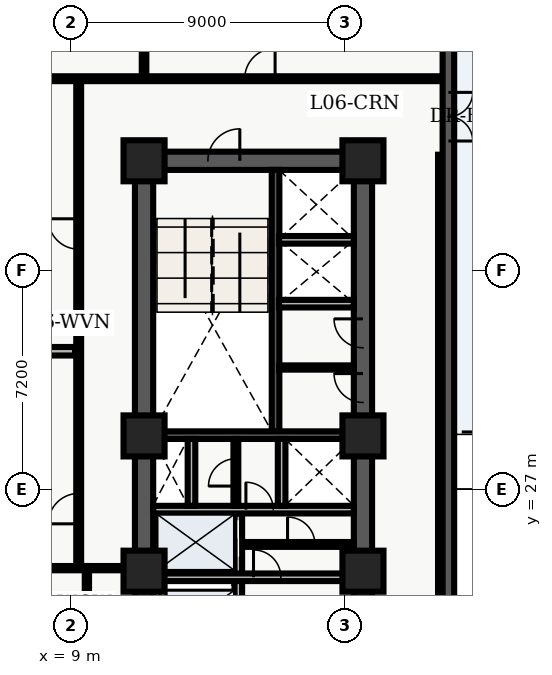
"""IFC4 building model, lengths in metres.
Left out: names, types, materials, properties, quantities, classifications, styles, units other than length and angle.
Written with IfcOpenShell. Run it as: python <this file> out.ifc"""

import sys

from ifc_helpers import new_model, entity, si_unit, converted_unit, direction, frame, origin_with_axes, origin_2d_with_axis, place, context, subcontext, project, spatial, polyline, rectangle, outline, extrude, element, fill, save


model = new_model("IFC4")
c1 = context("Model", 3, precision=1e-05, world=origin_with_axes(), true_north=direction((0.0, 1.0)))
c2 = subcontext(c1, "Body", "Model", "MODEL_VIEW")
j1 = project(units=[si_unit("LENGTHUNIT", "METRE"), converted_unit("PLANEANGLEUNIT", "DEGREE", entity("IfcPlaneAngleMeasure", 0.017), si_unit("PLANEANGLEUNIT", "RADIAN"), dimensions=[0, 0, 0, 0, 0, 0, 0])], contexts=[c1])
p1 = place(None, origin_with_axes())
s1 = spatial("IfcSite", under=j1, at=p1, CompositionType="ELEMENT")
p2 = place(p1, origin_with_axes())
s2 = spatial("IfcBuilding", under=s1, at=p2, CompositionType="ELEMENT")
p3 = place(p2, frame((0.0, 0.0, 28.8), z_axis=(0.0, 0.0, 1.0), x_axis=(1.0, 0.0, 0.0)))
s3 = spatial("IfcBuildingStorey", under=s2, at=p3, CompositionType="ELEMENT", Elevation=28.8)
p4 = place(p3, frame((11.4, 10.8, 0.0), z_axis=(0.0, 0.0, 1.0), x_axis=(0.0, 1.0, 0.0)))
e1 = element("IfcWall", 1, at=p4, inside=s3, PredefinedType="SHEAR", context=c2, shape_type="SweptSolid", body=[
    extrude(outline(polyline([(0.0, -0.3), (27.0, -0.3), (27.0, 0.3), (0.0, 0.3), (0.0, -0.3)])), origin_with_axes(), (0.0, 0.0, 1.0), 3.66),
])
p5 = place(p3, frame((11.4, 37.8, 0.0), z_axis=(0.0, 0.0, 1.0), x_axis=(1.0, 0.0, 0.0)))
e2 = element("IfcWall", 2, at=p5, inside=s3, PredefinedType="SHEAR", context=c2, shape_type="SweptSolid", body=[
    extrude(outline(polyline([(0.0, -0.3), (7.2, -0.3), (7.2, 0.3), (0.0, 0.3), (0.0, -0.3)])), origin_with_axes(), (0.0, 0.0, 1.0), 3.66),
])
p6 = place(p5, frame((2.625, 0.0, 0.0), z_axis=(0.0, 0.0, 1.0), x_axis=(1.0, 0.0, 0.0)))
e3 = element("IfcOpeningElement", 3, at=p6, cuts=e2, PredefinedType="OPENING", context=c2, shape_type="SweptSolid", body=[
    extrude(rectangle(XDim=1.05, YDim=0.62, at=origin_2d_with_axis()), origin_with_axes(), (0.0, 0.0, 1.0), 2.15),
])
p7 = place(p3, frame((18.6, 10.8, 0.0), z_axis=(0.0, 0.0, 1.0), x_axis=(0.0, 1.0, 0.0)))
e4 = element("IfcWall", 4, at=p7, inside=s3, PredefinedType="SHEAR", context=c2, shape_type="SweptSolid", body=[
    extrude(outline(polyline([(0.0, -0.3), (13.5, -0.3), (13.5, 0.3), (0.0, 0.3), (0.0, -0.3)])), origin_with_axes(), (0.0, 0.0, 1.0), 3.66),
])
p8 = place(p7, frame((1.3, 0.0, 0.0), z_axis=(0.0, 0.0, 1.0), x_axis=(1.0, 0.0, 0.0)))
e5 = element("IfcOpeningElement", 5, at=p8, cuts=e4, PredefinedType="OPENING", context=c2, shape_type="SweptSolid", body=[
    extrude(rectangle(XDim=1.1, YDim=0.62, at=origin_2d_with_axis()), origin_with_axes(), (0.0, 0.0, 1.0), 2.15),
])
p9 = place(p7, frame((3.4, 0.0, 0.0), z_axis=(0.0, 0.0, 1.0), x_axis=(1.0, 0.0, 0.0)))
e6 = element("IfcOpeningElement", 6, at=p9, cuts=e4, PredefinedType="OPENING", context=c2, shape_type="SweptSolid", body=[
    extrude(rectangle(XDim=1.1, YDim=0.62, at=origin_2d_with_axis()), origin_with_axes(), (0.0, 0.0, 1.0), 2.15),
])
p10 = place(p7, frame((11.125, 0.0, 0.0), z_axis=(0.0, 0.0, 1.0), x_axis=(1.0, 0.0, 0.0)))
e7 = element("IfcOpeningElement", 7, at=p10, cuts=e4, PredefinedType="OPENING", context=c2, shape_type="SweptSolid", body=[
    extrude(rectangle(XDim=1.05, YDim=0.62, at=origin_2d_with_axis()), origin_with_axes(), (0.0, 0.0, 1.0), 2.15),
])
p11 = place(p3, frame((18.6, 24.3, 0.0), z_axis=(0.0, 0.0, 1.0), x_axis=(0.0, 1.0, 0.0)))
e8 = element("IfcWall", 8, at=p11, inside=s3, PredefinedType="SHEAR", context=c2, shape_type="SweptSolid", body=[
    extrude(outline(polyline([(0.0, -0.3), (13.5, -0.3), (13.5, 0.3), (0.0, 0.3), (0.0, -0.3)])), origin_with_axes(), (0.0, 0.0, 1.0), 3.66),
])
p12 = place(p11, frame((6.025, 0.0, 0.0), z_axis=(0.0, 0.0, 1.0), x_axis=(1.0, 0.0, 0.0)))
e9 = element("IfcOpeningElement", 9, at=p12, cuts=e8, PredefinedType="OPENING", context=c2, shape_type="SweptSolid", body=[
    extrude(rectangle(XDim=0.95, YDim=0.62, at=origin_2d_with_axis()), origin_with_axes(), (0.0, 0.0, 1.0), 2.15),
])
p13 = place(p11, frame((7.825, 0.0, 0.0), z_axis=(0.0, 0.0, 1.0), x_axis=(1.0, 0.0, 0.0)))
e10 = element("IfcOpeningElement", 10, at=p13, cuts=e8, PredefinedType="OPENING", context=c2, shape_type="SweptSolid", body=[
    extrude(rectangle(XDim=0.95, YDim=0.62, at=origin_2d_with_axis()), origin_with_axes(), (0.0, 0.0, 1.0), 2.15),
])
p14 = place(p3, frame((15.725, 28.9, 0.0), z_axis=(0.0, 0.0, 1.0), x_axis=(0.0, 1.0, 0.0)))
e11 = element("IfcWall", 11, at=p14, inside=s3, PredefinedType="SHEAR", context=c2, shape_type="SweptSolid", body=[
    extrude(outline(polyline([(0.0, -0.125), (8.6, -0.125), (8.6, 0.125), (0.0, 0.125), (0.0, -0.125)])), origin_with_axes(), (0.0, 0.0, 1.0), 3.66),
])
p15 = place(p3, frame((11.7, 28.775, 0.0), z_axis=(0.0, 0.0, 1.0), x_axis=(1.0, 0.0, 0.0)))
e12 = element("IfcWall", 12, at=p15, inside=s3, PredefinedType="SHEAR", context=c2, shape_type="SweptSolid", body=[
    extrude(outline(polyline([(0.0, -0.125), (6.6, -0.125), (6.6, 0.125), (0.0, 0.125), (0.0, -0.125)])), origin_with_axes(), (0.0, 0.0, 1.0), 3.66),
])
p16 = place(p3, frame((14.5, 19.95, 0.0), z_axis=(0.0, 0.0, 1.0), x_axis=(0.0, 1.0, 0.0)))
e13 = element("IfcWall", 13, at=p16, inside=s3, PredefinedType="SOLIDWALL", context=c2, shape_type="SweptSolid", body=[
    extrude(outline(polyline([(0.0, -0.125), (6.25, -0.125), (6.25, 0.125), (0.0, 0.125), (0.0, -0.125)])), origin_with_axes(), (0.0, 0.0, 1.0), 2.7),
])
p17 = place(p16, frame((1.025, 0.0, 0.0), z_axis=(0.0, 0.0, 1.0), x_axis=(1.0, 0.0, 0.0)))
e14 = element("IfcOpeningElement", 14, at=p17, cuts=e13, PredefinedType="OPENING", context=c2, shape_type="SweptSolid", body=[
    extrude(rectangle(XDim=1.1, YDim=0.27, at=origin_2d_with_axis()), origin_with_axes(), (0.0, 0.0, 1.0), 2.15),
])
p18 = place(p16, frame((2.975, 0.0, 0.0), z_axis=(0.0, 0.0, 1.0), x_axis=(1.0, 0.0, 0.0)))
e15 = element("IfcOpeningElement", 15, at=p18, cuts=e13, PredefinedType="OPENING", context=c2, shape_type="SweptSolid", body=[
    extrude(rectangle(XDim=1.1, YDim=0.27, at=origin_2d_with_axis()), origin_with_axes(), (0.0, 0.0, 1.0), 2.15),
])
p19 = place(p16, frame((5.425, 0.0, 0.0), z_axis=(0.0, 0.0, 1.0), x_axis=(1.0, 0.0, 0.0)))
e16 = element("IfcOpeningElement", 16, at=p19, cuts=e13, PredefinedType="OPENING", context=c2, shape_type="SweptSolid", body=[
    extrude(rectangle(XDim=1.2, YDim=0.27, at=origin_2d_with_axis()), origin_with_axes(), (0.0, 0.0, 1.0), 2.15),
])
p20 = place(p3, frame((11.7, 24.1, 0.0), z_axis=(0.0, 0.0, 1.0), x_axis=(1.0, 0.0, 0.0)))
e17 = element("IfcWall", 17, at=p20, inside=s3, PredefinedType="SOLIDWALL", context=c2, shape_type="SweptSolid", body=[
    extrude(outline(polyline([(0.0, -0.125), (6.6, -0.125), (6.6, 0.125), (0.0, 0.125), (0.0, -0.125)])), origin_with_axes(), (0.0, 0.0, 1.0), 2.7),
])
p21 = place(p20, frame((3.75, 0.0, 0.0), z_axis=(0.0, 0.0, 1.0), x_axis=(1.0, 0.0, 0.0)))
e18 = element("IfcOpeningElement", 18, at=p21, cuts=e17, PredefinedType="OPENING", context=c2, shape_type="SweptSolid", body=[
    extrude(rectangle(XDim=0.9, YDim=0.27, at=origin_2d_with_axis()), origin_with_axes(), (0.0, 0.0, 1.0), 2.15),
])
p22 = place(p3, frame((11.7, 26.325, 0.0), z_axis=(0.0, 0.0, 1.0), x_axis=(1.0, 0.0, 0.0)))
e19 = element("IfcWall", 19, at=p22, inside=s3, PredefinedType="SOLIDWALL", context=c2, shape_type="SweptSolid", body=[
    extrude(outline(polyline([(0.0, -0.125), (6.6, -0.125), (6.6, 0.125), (0.0, 0.125), (0.0, -0.125)])), origin_with_axes(), (0.0, 0.0, 1.0), 2.7),
])
p23 = place(p22, frame((3.5, 0.0, 0.0), z_axis=(0.0, 0.0, 1.0), x_axis=(1.0, 0.0, 0.0)))
e20 = element("IfcOpeningElement", 20, at=p23, cuts=e19, PredefinedType="OPENING", context=c2, shape_type="SweptSolid", body=[
    extrude(rectangle(XDim=0.9, YDim=0.27, at=origin_2d_with_axis()), origin_with_axes(), (0.0, 0.0, 1.0), 2.15),
])
for number, where, z_axis, x_axis in (
    (21, (12.96, 26.45, 0.0), (0.0, 0.0, 1.0), (0.0, 1.0, 0.0)),
    (22, (15.925, 26.45, 0.0), (0.0, 0.0, 1.0), (0.0, 1.0, 0.0)),
):
    element("IfcWall", number, at=place(p3, frame(where, z_axis=z_axis, x_axis=x_axis)), inside=s3, PredefinedType="SOLIDWALL", context=c2, shape_type="SweptSolid", body=[
        extrude(outline(polyline([(0.0, -0.125), (2.2, -0.125), (2.2, 0.125), (0.0, 0.125), (0.0, -0.125)])), origin_with_axes(), (0.0, 0.0, 1.0), 2.7),
    ])
for number, where, z_axis, x_axis in (
    (23, (11.4, 24.3, 0.0), (0.0, 0.0, 1.0), (1.0, 0.0, 0.0)),
    (24, (11.4, 28.75, 0.0), (0.0, 0.0, 1.0), (1.0, 0.0, 0.0)),
    (25, (11.4, 37.8, 0.0), (0.0, 0.0, 1.0), (1.0, 0.0, 0.0)),
    (26, (18.6, 24.3, 0.0), (0.0, 0.0, 1.0), (1.0, 0.0, 0.0)),
    (27, (18.6, 28.75, 0.0), (0.0, 0.0, 1.0), (1.0, 0.0, 0.0)),
    (28, (18.6, 37.8, 0.0), (0.0, 0.0, 1.0), (1.0, 0.0, 0.0)),
):
    element("IfcColumn", number, at=place(p3, frame(where, z_axis=z_axis, x_axis=x_axis)), inside=s3, PredefinedType="COLUMN", context=c2, shape_type="SweptSolid", body=[
        extrude(rectangle(XDim=1.35, YDim=1.35, at=origin_2d_with_axis()), origin_with_axes(), (0.0, 0.0, 1.0), 3.9),
    ])
p24 = place(p3, frame((14.62, 25.18, 0.0), z_axis=(0.0, 0.0, 1.0), x_axis=(1.0, 0.0, 0.0)))
e29 = element("IfcWall", 29, at=p24, inside=s3, PredefinedType="PARTITIONING", context=c2, shape_type="SweptSolid", body=[
    extrude(outline(polyline([(0.0, -0.08), (3.68, -0.08), (3.68, 0.08), (0.0, 0.08), (0.0, -0.08)])), origin_with_axes(), (0.0, 0.0, 1.0), 2.7),
])
p25 = place(p24, frame((1.95, 0.0, 0.0), z_axis=(0.0, 0.0, 1.0), x_axis=(1.0, 0.0, 0.0)))
e30 = element("IfcOpeningElement", 30, at=p25, cuts=e29, PredefinedType="OPENING", context=c2, shape_type="SweptSolid", body=[
    extrude(rectangle(XDim=0.9, YDim=0.18, at=origin_2d_with_axis()), origin_with_axes(), (0.0, 0.0, 1.0), 2.15),
])
p26 = place(p3, frame((14.42, 26.45, 0.0), z_axis=(0.0, 0.0, 1.0), x_axis=(0.0, 1.0, 0.0)))
e31 = element("IfcWall", 31, at=p26, inside=s3, PredefinedType="PARTITIONING", context=c2, shape_type="SweptSolid", body=[
    extrude(outline(polyline([(0.0, -0.08), (2.2, -0.08), (2.2, 0.08), (0.0, 0.08), (0.0, -0.08)])), origin_with_axes(), (0.0, 0.0, 1.0), 2.7),
])
p27 = place(p26, frame((1.1, 0.0, 0.0), z_axis=(0.0, 0.0, 1.0), x_axis=(1.0, 0.0, 0.0)))
e32 = element("IfcOpeningElement", 32, at=p27, cuts=e31, PredefinedType="OPENING", context=c2, shape_type="SweptSolid", body=[
    extrude(rectangle(XDim=0.9, YDim=0.18, at=origin_2d_with_axis()), origin_with_axes(), (0.0, 0.0, 1.0), 2.15),
])
for number, where, z_axis, x_axis in (
    (33, (15.84, 33.1, 0.0), (0.0, 0.0, 1.0), (1.0, 0.0, 0.0)),
    (34, (15.84, 35.2, 0.0), (0.0, 0.0, 1.0), (1.0, 0.0, 0.0)),
):
    element("IfcWall", number, at=place(p3, frame(where, z_axis=z_axis, x_axis=x_axis)), inside=s3, PredefinedType="SOLIDWALL", context=c2, shape_type="SweptSolid", body=[
        extrude(outline(polyline([(0.0, -0.125), (2.46, -0.125), (2.46, 0.125), (0.0, 0.125), (0.0, -0.125)])), origin_with_axes(), (0.0, 0.0, 1.0), 2.7),
    ])
p28 = place(p3, frame((15.84, 31.0, 0.0), z_axis=(0.0, 0.0, 1.0), x_axis=(1.0, 0.0, 0.0)))
e35 = element("IfcWall", 35, at=p28, inside=s3, PredefinedType="PARTITIONING", context=c2, shape_type="SweptSolid", body=[
    extrude(outline(polyline([(0.0, -0.07), (2.46, -0.07), (2.46, 0.07), (0.0, 0.07), (0.0, -0.07)])), origin_with_axes(), (0.0, 0.0, 1.0), 2.7),
])
p29 = place(p3, frame((9.52, 20.4, 0.0), z_axis=(0.0, 0.0, 1.0), x_axis=(0.0, 1.0, 0.0)))
e36 = element("IfcWall", 36, at=p29, inside=s3, PredefinedType="PARTITIONING", context=c2, shape_type="SweptSolid", body=[
    extrude(outline(polyline([(0.0, -0.07), (4.0, -0.07), (4.0, 0.07), (0.0, 0.07), (0.0, -0.07)])), origin_with_axes(), (0.0, 0.0, 1.0), 2.7),
])
p30 = place(p3, frame((9.52, 24.4, 0.0), z_axis=(0.0, 0.0, 1.0), x_axis=(1.0, 0.0, 0.0)))
e37 = element("IfcWall", 37, at=p30, inside=s3, PredefinedType="PARTITIONING", context=c2, shape_type="SweptSolid", body=[
    extrude(outline(polyline([(0.0, -0.07), (1.58, -0.07), (1.58, 0.07), (0.0, 0.07), (0.0, -0.07)])), origin_with_axes(), (0.0, 0.0, 1.0), 2.7),
])
p31 = place(p3, frame((2.6, 40.5, 0.0), z_axis=(0.0, 0.0, 1.0), x_axis=(1.0, 0.0, 0.0)))
e38 = element("IfcWall", 38, at=p31, inside=s3, PredefinedType="PARTITIONING", context=c2, shape_type="SweptSolid", body=[
    extrude(outline(polyline([(0.0, -0.08), (18.65, -0.08), (18.65, 0.08), (0.0, 0.08), (0.0, -0.08)])), origin_with_axes(), (0.0, 0.0, 1.0), 2.7),
])
p32 = place(p31, frame((4.395, 0.0, 0.0), z_axis=(0.0, 0.0, 1.0), x_axis=(1.0, 0.0, 0.0)))
e39 = element("IfcOpeningElement", 39, at=p32, cuts=e38, PredefinedType="OPENING", context=c2, shape_type="SweptSolid", body=[
    extrude(rectangle(XDim=1.2, YDim=0.18, at=origin_2d_with_axis()), origin_with_axes(), (0.0, 0.0, 1.0), 2.2),
])
p33 = place(p31, frame((12.61, 0.0, 0.0), z_axis=(0.0, 0.0, 1.0), x_axis=(1.0, 0.0, 0.0)))
e40 = element("IfcOpeningElement", 40, at=p33, cuts=e38, PredefinedType="OPENING", context=c2, shape_type="SweptSolid", body=[
    extrude(rectangle(XDim=1.0, YDim=0.18, at=origin_2d_with_axis()), origin_with_axes(), (0.0, 0.0, 1.0), 2.15),
])
p34 = place(p3, frame((21.15, 7.8, 0.0), z_axis=(0.0, 0.0, 1.0), x_axis=(0.0, 1.0, 0.0)))
e41 = element("IfcWall", 41, at=p34, inside=s3, PredefinedType="PARTITIONING", context=c2, shape_type="SweptSolid", body=[
    extrude(outline(polyline([(0.0, -0.08), (30.2, -0.08), (30.2, 0.08), (0.0, 0.08), (0.0, -0.08)])), origin_with_axes(), (0.0, 0.0, 1.0), 2.7),
])
p35 = place(p34, frame((5.775, 0.0, 0.0), z_axis=(0.0, 0.0, 1.0), x_axis=(1.0, 0.0, 0.0)))
e42 = element("IfcOpeningElement", 42, at=p35, cuts=e41, PredefinedType="OPENING", context=c2, shape_type="SweptSolid", body=[
    extrude(rectangle(XDim=1.05, YDim=0.18, at=origin_2d_with_axis()), origin_with_axes(), (0.0, 0.0, 1.0), 2.15),
])
p36 = place(p3, frame((9.25, 24.4, 0.0), z_axis=(0.0, 0.0, 1.0), x_axis=(0.0, 1.0, 0.0)))
e43 = element("IfcWall", 43, at=p36, inside=s3, PredefinedType="PARTITIONING", context=c2, shape_type="SweptSolid", body=[
    extrude(outline(polyline([(0.0, -0.08), (16.1, -0.08), (16.1, 0.08), (0.0, 0.08), (0.0, -0.08)])), origin_with_axes(), (0.0, 0.0, 1.0), 2.7),
])
p37 = place(p36, frame((1.958, 0.0, 0.0), z_axis=(0.0, 0.0, 1.0), x_axis=(1.0, 0.0, 0.0)))
e44 = element("IfcOpeningElement", 44, at=p37, cuts=e43, PredefinedType="OPENING", context=c2, shape_type="SweptSolid", body=[
    extrude(rectangle(XDim=1.0, YDim=0.18, at=origin_2d_with_axis()), origin_with_axes(), (0.0, 0.0, 1.0), 2.15),
])
p38 = place(p36, frame((10.992, 0.0, 0.0), z_axis=(0.0, 0.0, 1.0), x_axis=(1.0, 0.0, 0.0)))
e45 = element("IfcOpeningElement", 45, at=p38, cuts=e43, PredefinedType="OPENING", context=c2, shape_type="SweptSolid", body=[
    extrude(rectangle(XDim=1.0, YDim=0.18, at=origin_2d_with_axis()), origin_with_axes(), (0.0, 0.0, 1.0), 2.15),
])
p39 = place(p3, frame((0.36, 24.4, 0.0), z_axis=(0.0, 0.0, 1.0), x_axis=(1.0, 0.0, 0.0)))
e46 = element("IfcWall", 46, at=p39, inside=s3, PredefinedType="PARTITIONING", context=c2, shape_type="SweptSolid", body=[
    extrude(outline(polyline([(0.0, -0.07), (9.16, -0.07), (9.16, 0.07), (0.0, 0.07), (0.0, -0.07)])), origin_with_axes(), (0.0, 0.0, 1.0), 2.7),
])
p40 = place(p3, frame((0.375, 31.535, 0.0), z_axis=(0.0, 0.0, 1.0), x_axis=(1.0, 0.0, 0.0)))
e47 = element("IfcWall", 47, at=p40, inside=s3, PredefinedType="PARTITIONING", context=c2, shape_type="SweptSolid", body=[
    extrude(outline(polyline([(0.0, -0.14), (8.755, -0.14), (8.755, 0.14), (0.0, 0.14), (0.0, -0.14)])), origin_with_axes(), (0.0, 0.0, 1.0), 2.7),
])
p41 = place(p3, frame((11.4, 40.6, 0.0), z_axis=(0.0, 0.0, 1.0), x_axis=(0.0, 1.0, 0.0)))
e48 = element("IfcWall", 48, at=p41, inside=s3, PredefinedType="PARTITIONING", context=c2, shape_type="SweptSolid", body=[
    extrude(outline(polyline([(0.0, -0.075), (7.64, -0.075), (7.64, 0.075), (0.0, 0.075), (0.0, -0.075)])), origin_with_axes(), (0.0, 0.0, 1.0), 2.7),
])
p42 = place(p3, frame((21.41, 45.82, 0.0), z_axis=(0.0, 0.0, 1.0), x_axis=(0.0, -1.0, 0.0)))
e49 = element("IfcWall", 49, at=p42, inside=s3, PredefinedType="SOLIDWALL", context=c2, shape_type="SweptSolid", body=[
    extrude(outline(polyline([(0.0, -0.19), (24.22, -0.19), (24.22, 0.19), (0.0, 0.19), (0.0, -0.19)])), origin_with_axes(), (0.0, 0.0, 1.0), 3.66),
])
p43 = place(p42, frame((6.57, 0.0, 0.0), z_axis=(0.0, 0.0, 1.0), x_axis=(1.0, 0.0, 0.0)))
e50 = element("IfcOpeningElement", 50, at=p43, cuts=e49, PredefinedType="OPENING", context=c2, shape_type="SweptSolid", body=[
    extrude(rectangle(XDim=1.6, YDim=0.4, at=origin_2d_with_axis()), origin_with_axes(), (0.0, 0.0, 1.0), 2.2),
])
p44 = place(p42, frame((2.902, 0.0, 0.45), z_axis=(0.0, 0.0, 1.0), x_axis=(1.0, 0.0, 0.0)))
e51 = element("IfcOpeningElement", 51, at=p44, cuts=e49, PredefinedType="OPENING", context=c2, shape_type="SweptSolid", body=[
    extrude(rectangle(XDim=2.1, YDim=0.4, at=origin_2d_with_axis()), origin_with_axes(), (0.0, 0.0, 1.0), 2.2),
])
p45 = place(p16, frame((5.425, 0.0, 0.0), z_axis=(0.0, 0.0, 1.0), x_axis=(1.0, 0.0, 0.0)))
e52 = element("IfcDoor", 52, at=p45, inside=s3, OperationType="DOUBLE_DOOR_SLIDING", PredefinedType="DOOR", context=c2, shape_type="SweptSolid", body=[
    extrude(rectangle(XDim=1.2, YDim=0.09, at=origin_2d_with_axis()), origin_with_axes(), (0.0, 0.0, 1.0), 2.15),
])
fill(e16, e52)
p46 = place(p5, frame((2.625, 0.0, 0.0), z_axis=(0.0, 0.0, 1.0), x_axis=(1.0, 0.0, 0.0)))
e53 = element("IfcDoor", 53, at=p46, inside=s3, OperationType="SINGLE_SWING_RIGHT", PredefinedType="DOOR", context=c2, shape_type="SweptSolid", body=[
    extrude(rectangle(XDim=1.05, YDim=0.09, at=origin_2d_with_axis()), origin_with_axes(), (0.0, 0.0, 1.0), 2.15),
])
fill(e3, e53)
p47 = place(p22, frame((3.5, 0.0, 0.0), z_axis=(0.0, 0.0, 1.0), x_axis=(1.0, 0.0, 0.0)))
e54 = element("IfcDoor", 54, at=p47, inside=s3, OperationType="SINGLE_SWING_LEFT", PredefinedType="DOOR", context=c2, shape_type="SweptSolid", body=[
    extrude(rectangle(XDim=0.9, YDim=0.09, at=origin_2d_with_axis()), origin_with_axes(), (0.0, 0.0, 1.0), 2.15),
])
fill(e20, e54)
p48 = place(p26, frame((1.1, 0.0, 0.0), z_axis=(0.0, 0.0, 1.0), x_axis=(1.0, 0.0, 0.0)))
e55 = element("IfcDoor", 55, at=p48, inside=s3, OperationType="SINGLE_SWING_LEFT", PredefinedType="DOOR", context=c2, shape_type="SweptSolid", body=[
    extrude(rectangle(XDim=0.9, YDim=0.09, at=origin_2d_with_axis()), origin_with_axes(), (0.0, 0.0, 1.0), 2.15),
])
fill(e32, e55)
p49 = place(p20, frame((3.75, 0.0, 0.0), z_axis=(0.0, 0.0, 1.0), x_axis=(1.0, 0.0, 0.0)))
e56 = element("IfcDoor", 56, at=p49, inside=s3, OperationType="SINGLE_SWING_LEFT", PredefinedType="DOOR", context=c2, shape_type="SweptSolid", body=[
    extrude(rectangle(XDim=0.9, YDim=0.09, at=origin_2d_with_axis()), origin_with_axes(), (0.0, 0.0, 1.0), 2.15),
])
fill(e18, e56)
p50 = place(p24, frame((1.95, 0.0, 0.0), z_axis=(0.0, 0.0, 1.0), x_axis=(1.0, 0.0, 0.0)))
e57 = element("IfcDoor", 57, at=p50, inside=s3, OperationType="SINGLE_SWING_LEFT", PredefinedType="DOOR", context=c2, shape_type="SweptSolid", body=[
    extrude(rectangle(XDim=0.9, YDim=0.09, at=origin_2d_with_axis()), origin_with_axes(), (0.0, 0.0, 1.0), 2.15),
])
fill(e30, e57)
p51 = place(p11, frame((6.025, 0.0, 0.0), z_axis=(0.0, 0.0, 1.0), x_axis=(1.0, 0.0, 0.0)))
e58 = element("IfcDoor", 58, at=p51, inside=s3, OperationType="SINGLE_SWING_RIGHT", PredefinedType="DOOR", context=c2, shape_type="SweptSolid", body=[
    extrude(rectangle(XDim=0.95, YDim=0.09, at=origin_2d_with_axis()), origin_with_axes(), (0.0, 0.0, 1.0), 2.15),
])
fill(e9, e58)
p52 = place(p11, frame((7.825, 0.0, 0.0), z_axis=(0.0, 0.0, 1.0), x_axis=(1.0, 0.0, 0.0)))
e59 = element("IfcDoor", 59, at=p52, inside=s3, OperationType="SINGLE_SWING_RIGHT", PredefinedType="DOOR", context=c2, shape_type="SweptSolid", body=[
    extrude(rectangle(XDim=0.95, YDim=0.09, at=origin_2d_with_axis()), origin_with_axes(), (0.0, 0.0, 1.0), 2.15),
])
fill(e10, e59)
p53 = place(p36, frame((1.958, 0.0, 0.0), z_axis=(0.0, 0.0, 1.0), x_axis=(1.0, 0.0, 0.0)))
e60 = element("IfcDoor", 60, at=p53, inside=s3, OperationType="SINGLE_SWING_LEFT", PredefinedType="DOOR", context=c2, shape_type="SweptSolid", body=[
    extrude(rectangle(XDim=1.0, YDim=0.09, at=origin_2d_with_axis()), origin_with_axes(), (0.0, 0.0, 1.0), 2.15),
])
fill(e44, e60)
p54 = place(p36, frame((10.992, 0.0, 0.0), z_axis=(0.0, 0.0, 1.0), x_axis=(1.0, 0.0, 0.0)))
e61 = element("IfcDoor", 61, at=p54, inside=s3, OperationType="SINGLE_SWING_RIGHT", PredefinedType="DOOR", context=c2, shape_type="SweptSolid", body=[
    extrude(rectangle(XDim=1.0, YDim=0.09, at=origin_2d_with_axis()), origin_with_axes(), (0.0, 0.0, 1.0), 2.15),
])
fill(e45, e61)
p55 = place(p31, frame((12.61, 0.0, 0.0), z_axis=(0.0, 0.0, 1.0), x_axis=(1.0, 0.0, 0.0)))
e62 = element("IfcDoor", 62, at=p55, inside=s3, OperationType="SINGLE_SWING_RIGHT", PredefinedType="DOOR", context=c2, shape_type="SweptSolid", body=[
    extrude(rectangle(XDim=1.0, YDim=0.09, at=origin_2d_with_axis()), origin_with_axes(), (0.0, 0.0, 1.0), 2.15),
])
fill(e40, e62)
p56 = place(p42, frame((6.57, 0.0, 0.0), z_axis=(0.0, 0.0, 1.0), x_axis=(1.0, 0.0, 0.0)))
e63 = element("IfcDoor", 63, at=p56, inside=s3, OperationType="DOUBLE_DOOR_SINGLE_SWING", PredefinedType="DOOR", context=c2, shape_type="SweptSolid", body=[
    extrude(rectangle(XDim=1.6, YDim=0.09, at=origin_2d_with_axis()), origin_with_axes(), (0.0, 0.0, 1.0), 2.2),
])
fill(e50, e63)
save(model, sys.argv[1])
